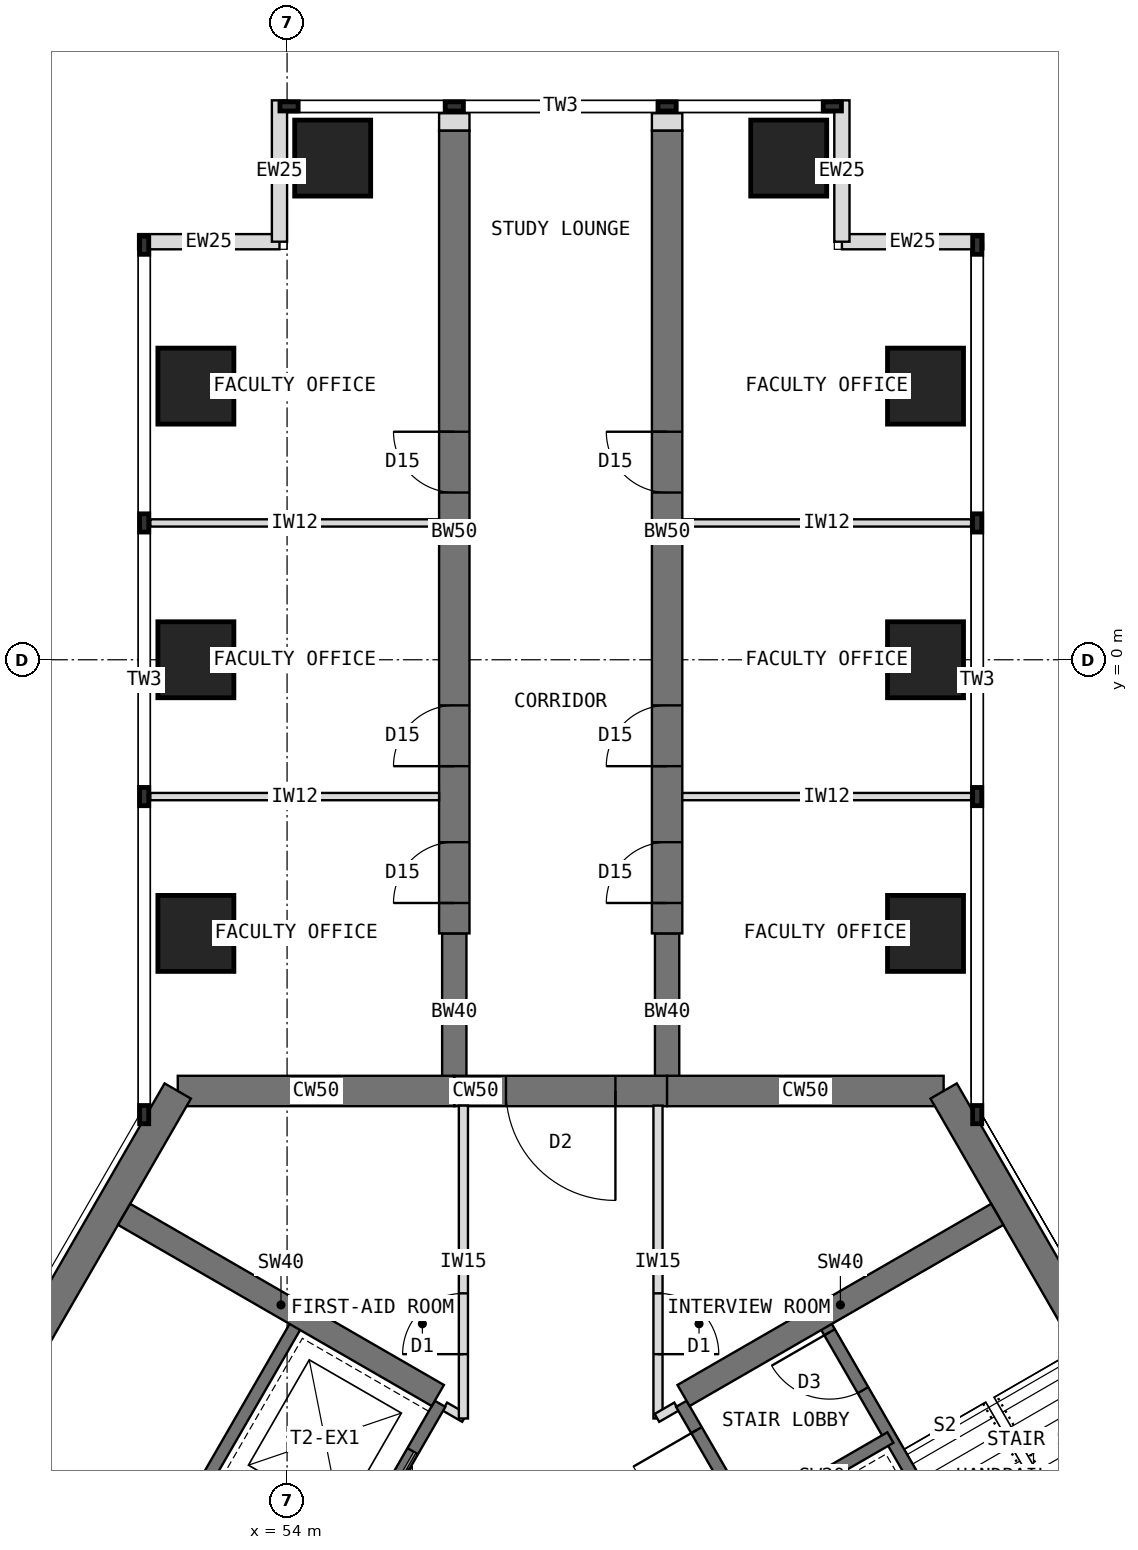
"""IFC4 building model, lengths in metres.
Left out: names, types, materials, properties, quantities, classifications, styles, units other than length and angle.
Written with IfcOpenShell. Run it as: python <this file> out.ifc"""

import sys

from ifc_helpers import new_model, si_unit, direction, frame, frame_2d, origin, origin_2d, place, context, subcontext, project, spatial, rectangle, extrude, element, fill, save


model = new_model("IFC4")
c1 = context("Model", 3, precision=1e-05, world=origin(), true_north=direction((0.0, 1.0)))
c2 = subcontext(c1, "Body", "Model", "MODEL_VIEW")
j1 = project(units=[si_unit("LENGTHUNIT", "METRE"), si_unit("PLANEANGLEUNIT", "RADIAN")], contexts=[c1])
p1 = place(None, origin())
s1 = spatial("IfcSite", under=j1, at=p1, CompositionType="ELEMENT")
p2 = place(p1, origin())
s2 = spatial("IfcBuilding", under=s1, at=p2, CompositionType="ELEMENT")
p3 = place(p2, frame((0.0, 0.0, 170.5)))
s3 = spatial("IfcBuildingStorey", under=s2, at=p3, CompositionType="ELEMENT", Elevation=170.5)
p4 = place(p3, frame((64.798, -7.092, 0.0), z_axis=(0.0, 0.0, 1.0), x_axis=(-1.0, 0.0, 0.0)))
e1 = element("IfcWall", 1, at=p4, inside=s3, PredefinedType="SHEAR", context=c2, shape_type="SweptSolid", body=[
    extrude(rectangle(XDim=4.548, YDim=0.5, at=frame_2d((2.274, 0.0))), origin(), (0.0, 0.0, 1.0), 4.0),
])
p5 = place(p3, frame((60.25, -7.092, 0.0), z_axis=(0.0, 0.0, 1.0), x_axis=(-1.0, 0.0, 0.0)))
e2 = element("IfcWall", 2, at=p5, inside=s3, PredefinedType="SHEAR", context=c2, shape_type="SweptSolid", body=[
    extrude(rectangle(XDim=3.5, YDim=0.5, at=frame_2d((1.75, 0.0))), origin(), (0.0, 0.0, 1.0), 4.0),
])
p6 = place(p5, frame((0.85, 0.0, 0.0)))
e3 = element("IfcOpeningElement", 3, at=p6, cuts=e2, PredefinedType="OPENING", context=c2, shape_type="SweptSolid", body=[
    extrude(rectangle(XDim=1.8, YDim=2.1, at=frame_2d((0.9, 1.05))), frame((0.0, 0.26, 0.0), z_axis=(0.0, -1.0, 0.0), x_axis=(1.0, 0.0, 0.0)), (0.0, 0.0, 1.0), 0.52),
])
p7 = place(p3, frame((56.75, -7.092, 0.0), z_axis=(0.0, 0.0, 1.0), x_axis=(-1.0, 0.0, 0.0)))
e4 = element("IfcWall", 4, at=p7, inside=s3, PredefinedType="SHEAR", context=c2, shape_type="SweptSolid", body=[
    extrude(rectangle(XDim=4.548, YDim=0.5, at=frame_2d((2.274, 0.0))), origin(), (0.0, 0.0, 1.0), 4.0),
])
for number, where, z_axis, x_axis in (
    (5, (52.202, -7.092, 0.0), (0.0, 0.0, 1.0), (-0.5, -0.866, 0.0)),
    (6, (71.096, -18.0, 0.0), (0.0, 0.0, 1.0), (-0.5, 0.866, 0.0)),
):
    element("IfcWall", number, at=place(p3, frame(where, z_axis=z_axis, x_axis=x_axis)), inside=s3, PredefinedType="SHEAR", context=c2, shape_type="SweptSolid", body=[
        extrude(rectangle(XDim=12.596, YDim=0.5, at=frame_2d((6.298, 0.0))), origin(), (0.0, 0.0, 1.0), 4.0),
    ])
p8 = place(p3, frame((56.75, -7.092, 0.0), z_axis=(0.0, 0.0, 1.0), x_axis=(0.0, 1.0, 0.0)))
e7 = element("IfcWall", 7, at=p8, inside=s3, PredefinedType="SHEAR", context=c2, shape_type="SweptSolid", body=[
    extrude(rectangle(XDim=2.592, YDim=0.4, at=frame_2d((1.296, 0.0))), origin(), (0.0, 0.0, 1.0), 4.0),
])
p9 = place(p3, frame((56.75, -4.5, 0.0), z_axis=(0.0, 0.0, 1.0), x_axis=(0.0, 1.0, 0.0)))
e8 = element("IfcWall", 8, at=p9, inside=s3, PredefinedType="SHEAR", context=c2, shape_type="SweptSolid", body=[
    extrude(rectangle(XDim=13.2, YDim=0.5, at=frame_2d((6.6, 0.0))), origin(), (0.0, 0.0, 1.0), 4.0),
])
p10 = place(p9, frame((0.5, 0.0, 0.0)))
e9 = element("IfcOpeningElement", 9, at=p10, cuts=e8, PredefinedType="OPENING", context=c2, shape_type="SweptSolid", body=[
    extrude(rectangle(XDim=1.0, YDim=2.1, at=frame_2d((0.5, 1.05))), frame((0.0, 0.26, 0.0), z_axis=(0.0, -1.0, 0.0), x_axis=(1.0, 0.0, 0.0)), (0.0, 0.0, 1.0), 0.52),
])
p11 = place(p9, frame((2.75, 0.0, 0.0)))
e10 = element("IfcOpeningElement", 10, at=p11, cuts=e8, PredefinedType="OPENING", context=c2, shape_type="SweptSolid", body=[
    extrude(rectangle(XDim=1.0, YDim=2.1, at=frame_2d((0.5, 1.05))), frame((0.0, 0.26, 0.0), z_axis=(0.0, -1.0, 0.0), x_axis=(1.0, 0.0, 0.0)), (0.0, 0.0, 1.0), 0.52),
])
p12 = place(p9, frame((7.25, 0.0, 0.0)))
e11 = element("IfcOpeningElement", 11, at=p12, cuts=e8, PredefinedType="OPENING", context=c2, shape_type="SweptSolid", body=[
    extrude(rectangle(XDim=1.0, YDim=2.1, at=frame_2d((0.5, 1.05))), frame((0.0, 0.26, 0.0), z_axis=(0.0, -1.0, 0.0), x_axis=(1.0, 0.0, 0.0)), (0.0, 0.0, 1.0), 0.52),
])
p13 = place(p3, frame((60.25, -7.092, 0.0), z_axis=(0.0, 0.0, 1.0), x_axis=(0.0, 1.0, 0.0)))
e12 = element("IfcWall", 12, at=p13, inside=s3, PredefinedType="SHEAR", context=c2, shape_type="SweptSolid", body=[
    extrude(rectangle(XDim=2.592, YDim=0.4, at=frame_2d((1.296, 0.0))), origin(), (0.0, 0.0, 1.0), 4.0),
])
p14 = place(p3, frame((60.25, -4.5, 0.0), z_axis=(0.0, 0.0, 1.0), x_axis=(0.0, 1.0, 0.0)))
e13 = element("IfcWall", 13, at=p14, inside=s3, PredefinedType="SHEAR", context=c2, shape_type="SweptSolid", body=[
    extrude(rectangle(XDim=13.2, YDim=0.5, at=frame_2d((6.6, 0.0))), origin(), (0.0, 0.0, 1.0), 4.0),
])
p15 = place(p14, frame((0.5, 0.0, 0.0)))
e14 = element("IfcOpeningElement", 14, at=p15, cuts=e13, PredefinedType="OPENING", context=c2, shape_type="SweptSolid", body=[
    extrude(rectangle(XDim=1.0, YDim=2.1, at=frame_2d((0.5, 1.05))), frame((0.0, 0.26, 0.0), z_axis=(0.0, -1.0, 0.0), x_axis=(1.0, 0.0, 0.0)), (0.0, 0.0, 1.0), 0.52),
])
p16 = place(p14, frame((2.75, 0.0, 0.0)))
e15 = element("IfcOpeningElement", 15, at=p16, cuts=e13, PredefinedType="OPENING", context=c2, shape_type="SweptSolid", body=[
    extrude(rectangle(XDim=1.0, YDim=2.1, at=frame_2d((0.5, 1.05))), frame((0.0, 0.26, 0.0), z_axis=(0.0, -1.0, 0.0), x_axis=(1.0, 0.0, 0.0)), (0.0, 0.0, 1.0), 0.52),
])
p17 = place(p14, frame((7.25, 0.0, 0.0)))
e16 = element("IfcOpeningElement", 16, at=p17, cuts=e13, PredefinedType="OPENING", context=c2, shape_type="SweptSolid", body=[
    extrude(rectangle(XDim=1.0, YDim=2.1, at=frame_2d((0.5, 1.05))), frame((0.0, 0.26, 0.0), z_axis=(0.0, -1.0, 0.0), x_axis=(1.0, 0.0, 0.0)), (0.0, 0.0, 1.0), 0.52),
])
for number, where, z_axis, x_axis in (
    (17, (52.5, -4.5, 0.0), (0.0, 0.0, 1.0), (1.0, 0.0, 0.0)),
    (18, (64.5, -4.5, 0.0), (0.0, 0.0, 1.0), (1.0, 0.0, 0.0)),
    (19, (52.5, 0.0, 0.0), (0.0, 0.0, 1.0), (1.0, 0.0, 0.0)),
    (20, (64.5, 0.0, 0.0), (0.0, 0.0, 1.0), (1.0, 0.0, 0.0)),
    (21, (52.5, 4.5, 0.0), (0.0, 0.0, 1.0), (1.0, 0.0, 0.0)),
    (22, (64.5, 4.5, 0.0), (0.0, 0.0, 1.0), (1.0, 0.0, 0.0)),
    (23, (54.75, 8.25, 0.0), (0.0, 0.0, 1.0), (1.0, 0.0, 0.0)),
    (24, (62.25, 8.25, 0.0), (0.0, 0.0, 1.0), (1.0, 0.0, 0.0)),
):
    element("IfcColumn", number, at=place(p3, frame(where, z_axis=z_axis, x_axis=x_axis)), inside=s3, PredefinedType="COLUMN", context=c2, shape_type="SweptSolid", body=[
        extrude(rectangle(XDim=1.25, YDim=1.25, at=origin_2d()), origin(), (0.0, 0.0, 1.0), 4.0),
    ])
for number, where, z_axis, x_axis in (
    (25, (51.55, 6.875, 0.0), (0.0, 0.0, 1.0), (1.0, 0.0, 0.0)),
    (26, (53.875, 6.875, 0.0), (0.0, 0.0, 1.0), (0.0, 1.0, 0.0)),
    (27, (65.45, 6.875, 0.0), (0.0, 0.0, 1.0), (-1.0, 0.0, 0.0)),
    (28, (63.125, 6.875, 0.0), (0.0, 0.0, 1.0), (0.0, 1.0, 0.0)),
):
    element("IfcWall", number, at=place(p3, frame(where, z_axis=z_axis, x_axis=x_axis)), inside=s3, PredefinedType="STANDARD", context=c2, shape_type="SweptSolid", body=[
        extrude(rectangle(XDim=2.325, YDim=0.25, at=frame_2d((1.163, 0.0))), origin(), (0.0, 0.0, 1.0), 3.8),
    ])
for number, where, z_axis, x_axis in (
    (29, (56.75, 8.7, 0.0), (0.0, 0.0, 1.0), (0.0, 1.0, 0.0)),
    (30, (60.25, 8.7, 0.0), (0.0, 0.0, 1.0), (0.0, 1.0, 0.0)),
):
    element("IfcWall", number, at=place(p3, frame(where, z_axis=z_axis, x_axis=x_axis)), inside=s3, PredefinedType="PARTITIONING", context=c2, shape_type="SweptSolid", body=[
        extrude(rectangle(XDim=0.288, YDim=0.5, at=frame_2d((0.144, 0.0))), origin(), (0.0, 0.0, 1.0), 3.8),
    ])
p18 = place(p3, frame((56.516, -12.236, 0.0), z_axis=(0.0, 0.0, 1.0), x_axis=(-0.49999894854, -0.866026010844, 0.0)))
e31 = element("IfcWall", 31, at=p18, inside=s3, PredefinedType="SHEAR", context=c2, shape_type="SweptSolid", body=[
    extrude(rectangle(XDim=8.0, YDim=0.2, at=frame_2d((4.0, 0.0))), origin(), (0.0, 0.0, 1.0), 4.0),
])
p19 = place(p18, frame((6.3, 0.0, 0.0)))
e32 = element("IfcOpeningElement", 32, at=p19, cuts=e31, PredefinedType="OPENING", context=c2, shape_type="SweptSolid", body=[
    extrude(rectangle(XDim=1.2, YDim=2.1, at=frame_2d((0.6, 1.05))), frame((0.0, 0.11, 0.0), z_axis=(0.0, -1.0, 0.0), x_axis=(1.0, 0.0, 0.0)), (0.0, 0.0, 1.0), 0.22),
])
p20 = place(p18, frame((0.9, 0.0, 0.0)))
e33 = element("IfcOpeningElement", 33, at=p20, cuts=e31, PredefinedType="OPENING", context=c2, shape_type="SweptSolid", body=[
    extrude(rectangle(XDim=1.1, YDim=2.2, at=frame_2d((0.55, 1.1))), frame((0.0, 0.11, 0.0), z_axis=(0.0, -1.0, 0.0), x_axis=(1.0, 0.0, 0.0)), (0.0, 0.0, 1.0), 0.22),
])
p21 = place(p18, frame((3.8, 0.0, 0.0)))
e34 = element("IfcOpeningElement", 34, at=p21, cuts=e31, PredefinedType="OPENING", context=c2, shape_type="SweptSolid", body=[
    extrude(rectangle(XDim=1.1, YDim=2.2, at=frame_2d((0.55, 1.1))), frame((0.0, 0.11, 0.0), z_axis=(0.0, -1.0, 0.0), x_axis=(1.0, 0.0, 0.0)), (0.0, 0.0, 1.0), 0.22),
])
p22 = place(p3, frame((54.98, -14.697, 0.0), z_axis=(0.0, 0.0, 1.0), x_axis=(-0.866062058628, 0.499936506574, 0.0)))
e35 = element("IfcWall", 35, at=p22, inside=s3, PredefinedType="SHEAR", context=c2, shape_type="SweptSolid", body=[
    extrude(rectangle(XDim=2.6, YDim=0.2, at=frame_2d((1.3, 0.0))), origin(), (0.0, 0.0, 1.0), 4.0),
])
p23 = place(p3, frame((54.178, -10.886, 0.0), z_axis=(0.0, 0.0, 1.0), x_axis=(-0.49999894854, -0.866026010844, 0.0)))
e36 = element("IfcWall", 36, at=p23, inside=s3, PredefinedType="SHEAR", context=c2, shape_type="SweptSolid", body=[
    extrude(rectangle(XDim=8.0, YDim=0.2, at=frame_2d((4.0, 0.0))), origin(), (0.0, 0.0, 1.0), 4.0),
])
p24 = place(p23, frame((6.8, 0.0, 0.0)))
e37 = element("IfcOpeningElement", 37, at=p24, cuts=e36, PredefinedType="OPENING", context=c2, shape_type="SweptSolid", body=[
    extrude(rectangle(XDim=0.9, YDim=2.1, at=frame_2d((0.45, 1.05))), frame((0.0, 0.11, 0.0), z_axis=(0.0, -1.0, 0.0), x_axis=(1.0, 0.0, 0.0)), (0.0, 0.0, 1.0), 0.22),
])
p25 = place(p3, frame((56.48, -12.099, 0.0), z_axis=(0.0, 0.0, 1.0), x_axis=(-0.86602319114, 0.500003832394, 0.0)))
e38 = element("IfcWall", 38, at=p25, inside=s3, PredefinedType="SHEAR", context=c2, shape_type="SweptSolid", body=[
    extrude(rectangle(XDim=5.958, YDim=0.4, at=frame_2d((2.979, 0.0))), origin(), (0.0, 0.0, 1.0), 4.0),
])
p26 = place(p3, frame((64.484, -19.164, 0.0), z_axis=(0.0, 0.0, 1.0), x_axis=(-0.49999894854, 0.866026010844, 0.0)))
e39 = element("IfcWall", 39, at=p26, inside=s3, PredefinedType="SHEAR", context=c2, shape_type="SweptSolid", body=[
    extrude(rectangle(XDim=8.0, YDim=0.2, at=frame_2d((4.0, 0.0))), origin(), (0.0, 0.0, 1.0), 4.0),
])
p27 = place(p26, frame((6.3, 0.0, 0.0)))
e40 = element("IfcOpeningElement", 40, at=p27, cuts=e39, PredefinedType="OPENING", context=c2, shape_type="SweptSolid", body=[
    extrude(rectangle(XDim=1.2, YDim=2.1, at=frame_2d((0.6, 1.05))), frame((0.0, 0.11, 0.0), z_axis=(0.0, -1.0, 0.0), x_axis=(1.0, 0.0, 0.0)), (0.0, 0.0, 1.0), 0.22),
])
p28 = place(p26, frame((0.9, 0.0, 0.0)))
e41 = element("IfcOpeningElement", 41, at=p28, cuts=e39, PredefinedType="OPENING", context=c2, shape_type="SweptSolid", body=[
    extrude(rectangle(XDim=1.1, YDim=2.2, at=frame_2d((0.55, 1.1))), frame((0.0, 0.11, 0.0), z_axis=(0.0, -1.0, 0.0), x_axis=(1.0, 0.0, 0.0)), (0.0, 0.0, 1.0), 0.22),
])
p29 = place(p26, frame((3.8, 0.0, 0.0)))
e42 = element("IfcOpeningElement", 42, at=p29, cuts=e39, PredefinedType="OPENING", context=c2, shape_type="SweptSolid", body=[
    extrude(rectangle(XDim=1.1, YDim=2.2, at=frame_2d((0.55, 1.1))), frame((0.0, 0.11, 0.0), z_axis=(0.0, -1.0, 0.0), x_axis=(1.0, 0.0, 0.0)), (0.0, 0.0, 1.0), 0.22),
])
p30 = place(p3, frame((61.67, -14.091, 0.0), z_axis=(0.0, 0.0, 1.0), x_axis=(0.86603858612, 0.49997716683, 0.0)))
e43 = element("IfcWall", 43, at=p30, inside=s3, PredefinedType="SHEAR", context=c2, shape_type="SweptSolid", body=[
    extrude(rectangle(XDim=2.6, YDim=0.2, at=frame_2d((1.3, 0.0))), origin(), (0.0, 0.0, 1.0), 4.0),
])
p31 = place(p3, frame((66.822, -17.814, 0.0), z_axis=(0.0, 0.0, 1.0), x_axis=(-0.49999894854, 0.866026010844, 0.0)))
e44 = element("IfcWall", 44, at=p31, inside=s3, PredefinedType="SHEAR", context=c2, shape_type="SweptSolid", body=[
    extrude(rectangle(XDim=8.0, YDim=0.2, at=frame_2d((4.0, 0.0))), origin(), (0.0, 0.0, 1.0), 4.0),
])
p32 = place(p31, frame((6.7, 0.0, 0.0)))
e45 = element("IfcOpeningElement", 45, at=p32, cuts=e44, PredefinedType="OPENING", context=c2, shape_type="SweptSolid", body=[
    extrude(rectangle(XDim=1.1, YDim=2.1, at=frame_2d((0.55, 1.05))), frame((0.0, 0.11, 0.0), z_axis=(0.0, -1.0, 0.0), x_axis=(1.0, 0.0, 0.0)), (0.0, 0.0, 1.0), 0.22),
])
p33 = place(p3, frame((60.52, -12.099, 0.0), z_axis=(0.0, 0.0, 1.0), x_axis=(0.86602319114, 0.500003832394, 0.0)))
e46 = element("IfcWall", 46, at=p33, inside=s3, PredefinedType="SHEAR", context=c2, shape_type="SweptSolid", body=[
    extrude(rectangle(XDim=5.958, YDim=0.4, at=frame_2d((2.979, 0.0))), origin(), (0.0, 0.0, 1.0), 4.0),
])
for number, where, z_axis, x_axis in (
    (47, (56.5, -2.25, 0.0), (0.0, 0.0, 1.0), (-1.0, 0.0, 0.0)),
    (48, (56.5, 2.25, 0.0), (0.0, 0.0, 1.0), (-1.0, 0.0, 0.0)),
    (49, (60.5, -2.25, 0.0), (0.0, 0.0, 1.0), (1.0, 0.0, 0.0)),
    (50, (60.5, 2.25, 0.0), (0.0, 0.0, 1.0), (1.0, 0.0, 0.0)),
):
    element("IfcWall", number, at=place(p3, frame(where, z_axis=z_axis, x_axis=x_axis)), inside=s3, PredefinedType="PARTITIONING", context=c2, shape_type="SweptSolid", body=[
        extrude(rectangle(XDim=4.75, YDim=0.12, at=frame_2d((2.375, 0.0))), origin(), (0.0, 0.0, 1.0), 3.8),
    ])
p34 = place(p3, frame((56.594, -12.281, 0.0), z_axis=(0.0, 0.0, 1.0), x_axis=(0.866261881104, -0.499590185398, 0.0)))
e51 = element("IfcWall", 51, at=p34, inside=s3, PredefinedType="PARTITIONING", context=c2, shape_type="SweptSolid", body=[
    extrude(rectangle(XDim=0.373, YDim=0.15, at=frame_2d((0.187, 0.0))), origin(), (0.0, 0.0, 1.0), 3.8),
])
p35 = place(p3, frame((56.9, -12.477, 0.0), z_axis=(0.0, 0.0, 1.0), x_axis=(0.0, 1.0, 0.0)))
e52 = element("IfcWall", 52, at=p35, inside=s3, PredefinedType="PARTITIONING", context=c2, shape_type="SweptSolid", body=[
    extrude(rectangle(XDim=5.146, YDim=0.15, at=frame_2d((2.573, 0.0))), origin(), (0.0, 0.0, 1.0), 3.8),
])
p36 = place(p35, frame((1.058, 0.0, 0.0)))
e53 = element("IfcOpeningElement", 53, at=p36, cuts=e52, PredefinedType="OPENING", context=c2, shape_type="SweptSolid", body=[
    extrude(rectangle(XDim=1.0, YDim=2.1, at=frame_2d((0.5, 1.05))), frame((0.0, 0.085, 0.0), z_axis=(0.0, -1.0, 0.0), x_axis=(1.0, 0.0, 0.0)), (0.0, 0.0, 1.0), 0.17),
])
p37 = place(p3, frame((60.1, -7.332, 0.0), z_axis=(0.0, 0.0, 1.0), x_axis=(0.0, -1.0, 0.0)))
e54 = element("IfcWall", 54, at=p37, inside=s3, PredefinedType="PARTITIONING", context=c2, shape_type="SweptSolid", body=[
    extrude(rectangle(XDim=5.146, YDim=0.15, at=frame_2d((2.573, 0.0))), origin(), (0.0, 0.0, 1.0), 3.8),
])
p38 = place(p37, frame((3.088, 0.0, 0.0)))
e55 = element("IfcOpeningElement", 55, at=p38, cuts=e54, PredefinedType="OPENING", context=c2, shape_type="SweptSolid", body=[
    extrude(rectangle(XDim=1.0, YDim=2.1, at=frame_2d((0.5, 1.05))), frame((0.0, 0.085, 0.0), z_axis=(0.0, -1.0, 0.0), x_axis=(1.0, 0.0, 0.0)), (0.0, 0.0, 1.0), 0.17),
])
p39 = place(p3, frame((60.083, -12.467, 0.0), z_axis=(0.0, 0.0, 1.0), x_axis=(0.866261881104, 0.499590185398, 0.0)))
e56 = element("IfcWall", 56, at=p39, inside=s3, PredefinedType="PARTITIONING", context=c2, shape_type="SweptSolid", body=[
    extrude(rectangle(XDim=0.373, YDim=0.15, at=frame_2d((0.187, 0.0))), origin(), (0.0, 0.0, 1.0), 3.8),
])
p40 = place(p20, origin())
e57 = element("IfcDoor", 57, at=p40, inside=s3, OperationType="DOUBLE_DOOR_SLIDING", PredefinedType="DOOR", context=c2, shape_type="SweptSolid", body=[
    extrude(rectangle(XDim=1.1, YDim=2.2, at=frame_2d((0.55, 1.1))), frame((0.0, 0.025, 0.0), z_axis=(0.0, -1.0, 0.0), x_axis=(1.0, 0.0, 0.0)), (0.0, 0.0, 1.0), 0.05),
])
fill(e33, e57)
p41 = place(p27, origin())
e58 = element("IfcDoor", 58, at=p41, inside=s3, OperationType="SINGLE_SWING_RIGHT", PredefinedType="DOOR", context=c2, shape_type="SweptSolid", body=[
    extrude(rectangle(XDim=1.2, YDim=2.1, at=frame_2d((0.6, 1.05))), frame((0.0, 0.025, 0.0), z_axis=(0.0, -1.0, 0.0), x_axis=(1.0, 0.0, 0.0)), (0.0, 0.0, 1.0), 0.05),
])
fill(e40, e58)
p42 = place(p32, origin())
e59 = element("IfcDoor", 59, at=p42, inside=s3, OperationType="SINGLE_SWING_RIGHT", PredefinedType="DOOR", context=c2, shape_type="SweptSolid", body=[
    extrude(rectangle(XDim=1.1, YDim=2.1, at=frame_2d((0.55, 1.05))), frame((0.0, 0.025, 0.0), z_axis=(0.0, -1.0, 0.0), x_axis=(1.0, 0.0, 0.0)), (0.0, 0.0, 1.0), 0.05),
])
fill(e45, e59)
p43 = place(p6, origin())
e60 = element("IfcDoor", 60, at=p43, inside=s3, OperationType="DOUBLE_DOOR_DOUBLE_SWING", PredefinedType="DOOR", context=c2, shape_type="SweptSolid", body=[
    extrude(rectangle(XDim=1.8, YDim=2.1, at=frame_2d((0.9, 1.05))), frame((0.0, 0.025, 0.0), z_axis=(0.0, -1.0, 0.0), x_axis=(1.0, 0.0, 0.0)), (0.0, 0.0, 1.0), 0.05),
])
fill(e3, e60)
p44 = place(p38, origin())
e61 = element("IfcDoor", 61, at=p44, inside=s3, OperationType="SINGLE_SWING_RIGHT", PredefinedType="DOOR", context=c2, shape_type="SweptSolid", body=[
    extrude(rectangle(XDim=1.0, YDim=2.1, at=frame_2d((0.5, 1.05))), frame((0.0, 0.025, 0.0), z_axis=(0.0, -1.0, 0.0), x_axis=(1.0, 0.0, 0.0)), (0.0, 0.0, 1.0), 0.05),
])
fill(e55, e61)
p45 = place(p36, origin())
e62 = element("IfcDoor", 62, at=p45, inside=s3, OperationType="SINGLE_SWING_LEFT", PredefinedType="DOOR", context=c2, shape_type="SweptSolid", body=[
    extrude(rectangle(XDim=1.0, YDim=2.1, at=frame_2d((0.5, 1.05))), frame((0.0, 0.025, 0.0), z_axis=(0.0, -1.0, 0.0), x_axis=(1.0, 0.0, 0.0)), (0.0, 0.0, 1.0), 0.05),
])
fill(e53, e62)
p46 = place(p10, origin())
e63 = element("IfcDoor", 63, at=p46, inside=s3, OperationType="SINGLE_SWING_LEFT", PredefinedType="DOOR", context=c2, shape_type="SweptSolid", body=[
    extrude(rectangle(XDim=1.0, YDim=2.1, at=frame_2d((0.5, 1.05))), frame((0.0, 0.025, 0.0), z_axis=(0.0, -1.0, 0.0), x_axis=(1.0, 0.0, 0.0)), (0.0, 0.0, 1.0), 0.05),
])
fill(e9, e63)
p47 = place(p11, origin())
e64 = element("IfcDoor", 64, at=p47, inside=s3, OperationType="SINGLE_SWING_LEFT", PredefinedType="DOOR", context=c2, shape_type="SweptSolid", body=[
    extrude(rectangle(XDim=1.0, YDim=2.1, at=frame_2d((0.5, 1.05))), frame((0.0, 0.025, 0.0), z_axis=(0.0, -1.0, 0.0), x_axis=(1.0, 0.0, 0.0)), (0.0, 0.0, 1.0), 0.05),
])
fill(e10, e64)
p48 = place(p12, origin())
e65 = element("IfcDoor", 65, at=p48, inside=s3, OperationType="SINGLE_SWING_RIGHT", PredefinedType="DOOR", context=c2, shape_type="SweptSolid", body=[
    extrude(rectangle(XDim=1.0, YDim=2.1, at=frame_2d((0.5, 1.05))), frame((0.0, 0.025, 0.0), z_axis=(0.0, -1.0, 0.0), x_axis=(1.0, 0.0, 0.0)), (0.0, 0.0, 1.0), 0.05),
])
fill(e11, e65)
p49 = place(p15, origin())
e66 = element("IfcDoor", 66, at=p49, inside=s3, OperationType="SINGLE_SWING_LEFT", PredefinedType="DOOR", context=c2, shape_type="SweptSolid", body=[
    extrude(rectangle(XDim=1.0, YDim=2.1, at=frame_2d((0.5, 1.05))), frame((0.0, 0.025, 0.0), z_axis=(0.0, -1.0, 0.0), x_axis=(1.0, 0.0, 0.0)), (0.0, 0.0, 1.0), 0.05),
])
fill(e14, e66)
p50 = place(p16, origin())
e67 = element("IfcDoor", 67, at=p50, inside=s3, OperationType="SINGLE_SWING_LEFT", PredefinedType="DOOR", context=c2, shape_type="SweptSolid", body=[
    extrude(rectangle(XDim=1.0, YDim=2.1, at=frame_2d((0.5, 1.05))), frame((0.0, 0.025, 0.0), z_axis=(0.0, -1.0, 0.0), x_axis=(1.0, 0.0, 0.0)), (0.0, 0.0, 1.0), 0.05),
])
fill(e15, e67)
p51 = place(p17, origin())
e68 = element("IfcDoor", 68, at=p51, inside=s3, OperationType="SINGLE_SWING_RIGHT", PredefinedType="DOOR", context=c2, shape_type="SweptSolid", body=[
    extrude(rectangle(XDim=1.0, YDim=2.1, at=frame_2d((0.5, 1.05))), frame((0.0, 0.025, 0.0), z_axis=(0.0, -1.0, 0.0), x_axis=(1.0, 0.0, 0.0)), (0.0, 0.0, 1.0), 0.05),
])
fill(e16, e68)
save(model, sys.argv[1])
